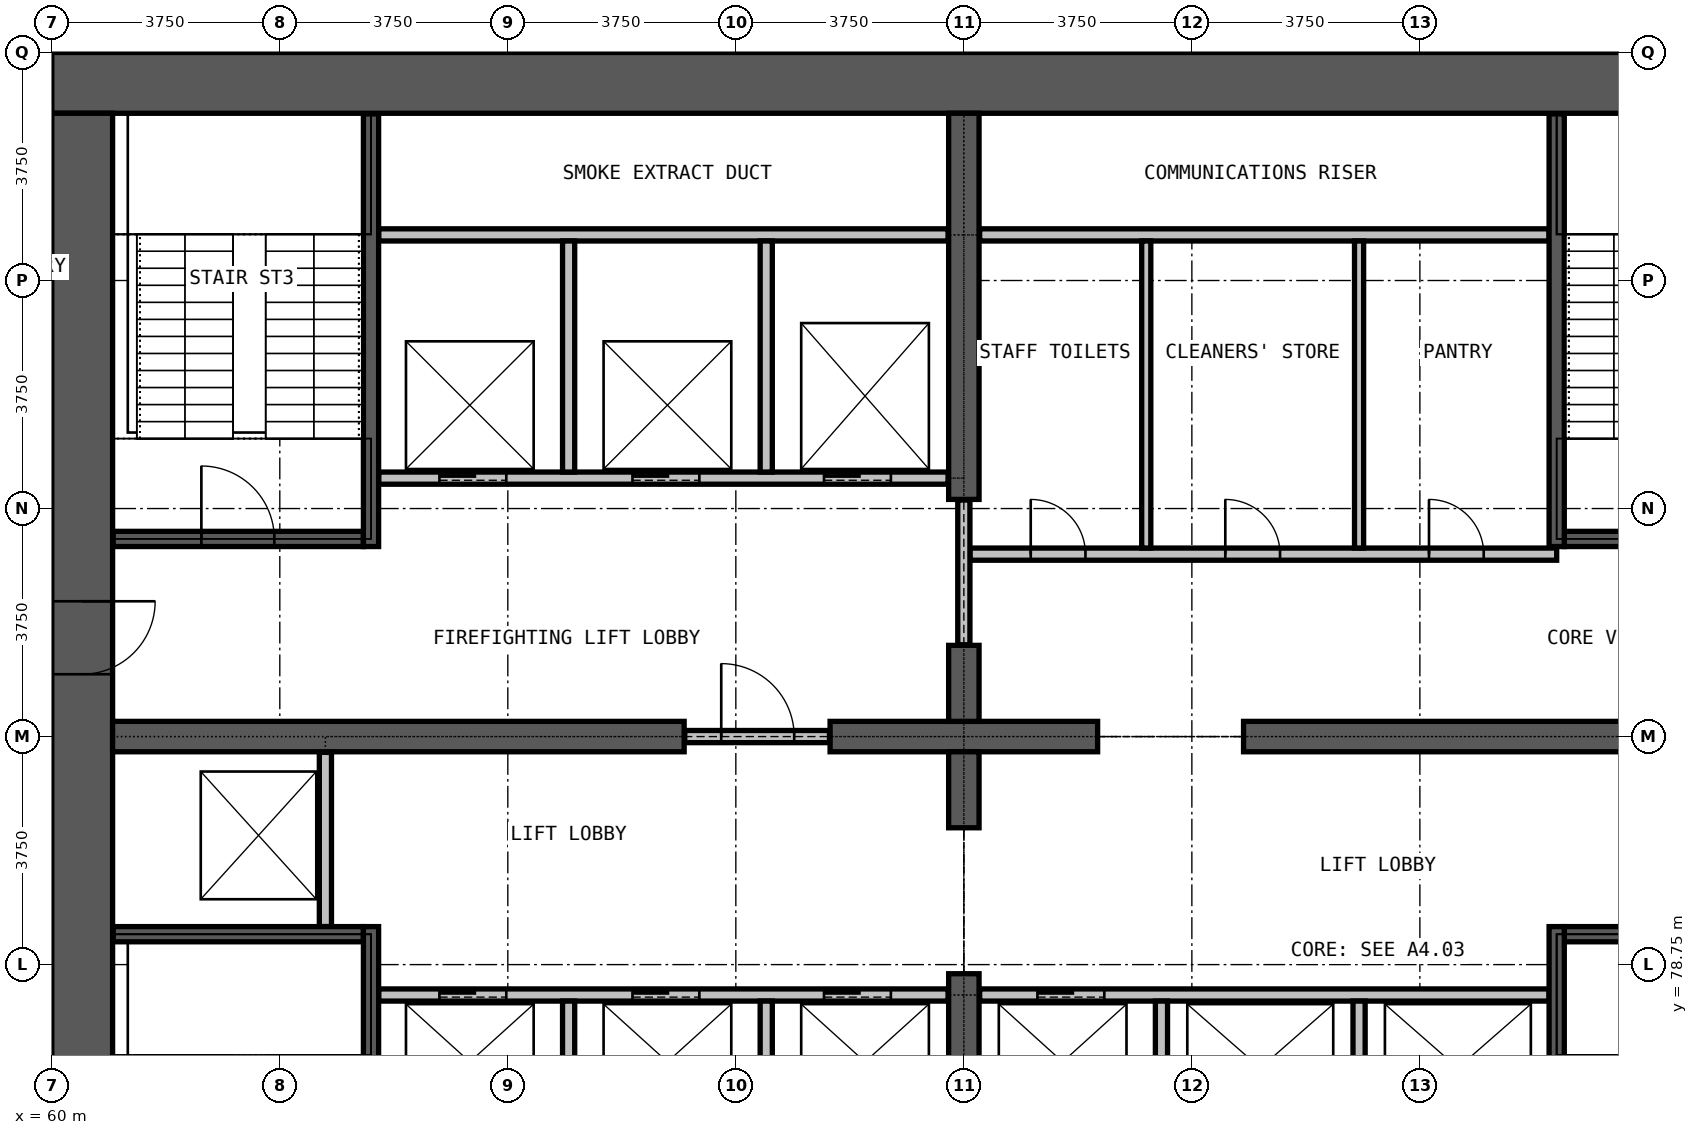
"""IFC4 building model, lengths in metres.
Left out: names, types, materials, properties, quantities, classifications, styles, units other than length and angle.
Written with IfcOpenShell. Run it as: python <this file> out.ifc"""

import sys

from ifc_helpers import new_model, si_unit, direction, frame, frame_2d, origin, place, context, subcontext, project, spatial, rectangle, extrude, element, fill, save


model = new_model("IFC4")
c1 = context("Model", 3, precision=1e-05, world=origin(), true_north=direction((0.0, 1.0)))
c2 = subcontext(c1, "Body", "Model", "MODEL_VIEW")
j1 = project(units=[si_unit("LENGTHUNIT", "METRE"), si_unit("PLANEANGLEUNIT", "RADIAN")], contexts=[c1])
p1 = place(None, origin())
s1 = spatial("IfcSite", under=j1, at=p1, CompositionType="ELEMENT")
p2 = place(p1, origin())
s2 = spatial("IfcBuilding", under=s1, at=p2, CompositionType="ELEMENT")
p3 = place(p2, frame((0.0, 0.0, 7.5)))
s3 = spatial("IfcBuildingStorey", under=s2, at=p3, CompositionType="ELEMENT", Elevation=7.5)
p4 = place(p3, frame((90.0, 93.25, 0.0), z_axis=(0.0, 0.0, 1.0), x_axis=(-1.0, 0.0, 0.0)))
e1 = element("IfcWall", 1, at=p4, inside=s3, PredefinedType="SHEAR", context=c2, shape_type="SweptSolid", body=[
    extrude(rectangle(XDim=30.0, YDim=1.0, at=frame_2d((15.0, 0.0))), origin(), (0.0, 0.0, 1.0), 9.0),
])
p5 = place(p3, frame((60.5, 92.75, 0.0), z_axis=(0.0, 0.0, 1.0), x_axis=(0.0, -1.0, 0.0)))
e2 = element("IfcWall", 2, at=p5, inside=s3, PredefinedType="SHEAR", context=c2, shape_type="SweptSolid", body=[
    extrude(rectangle(XDim=20.5, YDim=1.0, at=frame_2d((10.25, 0.0))), origin(), (0.0, 0.0, 1.0), 9.0),
])
p6 = place(p5, frame((19.025, 0.0, 0.0)))
e3 = element("IfcOpeningElement", 3, at=p6, cuts=e2, PredefinedType="OPENING", context=c2, shape_type="SweptSolid", body=[
    extrude(rectangle(XDim=1.2, YDim=2.2, at=frame_2d((0.6, 1.1))), frame((0.0, 0.51, 0.0), z_axis=(0.0, -1.0, 0.0), x_axis=(1.0, 0.0, 0.0)), (0.0, 0.0, 1.0), 1.02),
])
p7 = place(p5, frame((8.025, 0.0, 0.0)))
e4 = element("IfcOpeningElement", 4, at=p7, cuts=e2, PredefinedType="OPENING", context=c2, shape_type="SweptSolid", body=[
    extrude(rectangle(XDim=1.2, YDim=2.2, at=frame_2d((0.6, 1.1))), frame((0.0, 0.51, 0.0), z_axis=(0.0, -1.0, 0.0), x_axis=(1.0, 0.0, 0.0)), (0.0, 0.0, 1.0), 1.02),
])
p8 = place(p3, frame((61.0, 82.5, 0.0), z_axis=(0.0, 0.0, 1.0), x_axis=(1.0, 0.0, 0.0)))
e5 = element("IfcWall", 5, at=p8, inside=s3, PredefinedType="SHEAR", context=c2, shape_type="SweptSolid", body=[
    extrude(rectangle(XDim=9.4, YDim=0.5, at=frame_2d((4.7, 0.0))), origin(), (0.0, 0.0, 1.0), 9.0),
])
p9 = place(p3, frame((72.8, 82.5, 0.0), z_axis=(0.0, 0.0, 1.0), x_axis=(1.0, 0.0, 0.0)))
e6 = element("IfcWall", 6, at=p9, inside=s3, PredefinedType="SHEAR", context=c2, shape_type="SweptSolid", body=[
    extrude(rectangle(XDim=4.4, YDim=0.5, at=frame_2d((2.2, 0.0))), origin(), (0.0, 0.0, 1.0), 9.0),
])
p10 = place(p3, frame((79.6, 82.5, 0.0), z_axis=(0.0, 0.0, 1.0), x_axis=(1.0, 0.0, 0.0)))
e7 = element("IfcWall", 7, at=p10, inside=s3, PredefinedType="SHEAR", context=c2, shape_type="SweptSolid", body=[
    extrude(rectangle(XDim=9.4, YDim=0.5, at=frame_2d((4.7, 0.0))), origin(), (0.0, 0.0, 1.0), 9.0),
])
p11 = place(p3, frame((75.0, 72.25, 0.0), z_axis=(0.0, 0.0, 1.0), x_axis=(0.0, 1.0, 0.0)))
e8 = element("IfcWall", 8, at=p11, inside=s3, PredefinedType="SHEAR", context=c2, shape_type="SweptSolid", body=[
    extrude(rectangle(XDim=6.35, YDim=0.5, at=frame_2d((3.175, 0.0))), origin(), (0.0, 0.0, 1.0), 9.0),
])
for number, where, z_axis, x_axis in (
    (9, (75.0, 81.0, 0.0), (0.0, 0.0, 1.0), (0.0, 1.0, 0.0)),
    (10, (75.0, 82.75, 0.0), (0.0, 0.0, 1.0), (0.0, 1.0, 0.0)),
):
    element("IfcWall", number, at=place(p3, frame(where, z_axis=z_axis, x_axis=x_axis)), inside=s3, PredefinedType="SHEAR", context=c2, shape_type="SweptSolid", body=[
        extrude(rectangle(XDim=1.25, YDim=0.5, at=frame_2d((0.625, 0.0))), origin(), (0.0, 0.0, 1.0), 9.0),
    ])
p12 = place(p3, frame((75.0, 86.4, 0.0), z_axis=(0.0, 0.0, 1.0), x_axis=(0.0, 1.0, 0.0)))
e11 = element("IfcWall", 11, at=p12, inside=s3, PredefinedType="SHEAR", context=c2, shape_type="SweptSolid", body=[
    extrude(rectangle(XDim=6.35, YDim=0.5, at=frame_2d((3.175, 0.0))), origin(), (0.0, 0.0, 1.0), 9.0),
])
p13 = place(p3, frame((70.41, 82.5, 0.0), z_axis=(0.0, 0.0, 1.0), x_axis=(1.0, 0.0, 0.0)))
e12 = element("IfcWall", 12, at=p13, inside=s3, PredefinedType="PARTITIONING", context=c2, shape_type="SweptSolid", body=[
    extrude(rectangle(XDim=2.38, YDim=0.2, at=frame_2d((1.19, 0.0))), origin(), (0.0, 0.0, 1.0), 2.4),
])
p14 = place(p13, frame((0.6, 0.0, 0.0)))
e13 = element("IfcOpeningElement", 13, at=p14, cuts=e12, PredefinedType="OPENING", context=c2, shape_type="SweptSolid", body=[
    extrude(rectangle(XDim=1.2, YDim=2.2, at=frame_2d((0.6, 1.1))), frame((0.0, 0.11, 0.0), z_axis=(0.0, -1.0, 0.0), x_axis=(1.0, 0.0, 0.0)), (0.0, 0.0, 1.0), 0.22),
])
p15 = place(p3, frame((75.1, 85.5, 0.0), z_axis=(0.0, 0.0, 1.0), x_axis=(1.0, 0.0, 0.0)))
e14 = element("IfcWall", 14, at=p15, inside=s3, PredefinedType="PARTITIONING", context=c2, shape_type="SweptSolid", body=[
    extrude(rectangle(XDim=9.65, YDim=0.2, at=frame_2d((4.825, 0.0))), origin(), (0.0, 0.0, 1.0), 8.65),
])
p16 = place(p15, frame((1.0, 0.0, 0.0)))
e15 = element("IfcOpeningElement", 15, at=p16, cuts=e14, PredefinedType="OPENING", context=c2, shape_type="SweptSolid", body=[
    extrude(rectangle(XDim=0.9, YDim=2.2, at=frame_2d((0.45, 1.1))), frame((0.0, 0.11, 0.0), z_axis=(0.0, -1.0, 0.0), x_axis=(1.0, 0.0, 0.0)), (0.0, 0.0, 1.0), 0.22),
])
p17 = place(p15, frame((4.2, 0.0, 0.0)))
e16 = element("IfcOpeningElement", 16, at=p17, cuts=e14, PredefinedType="OPENING", context=c2, shape_type="SweptSolid", body=[
    extrude(rectangle(XDim=0.9, YDim=2.2, at=frame_2d((0.45, 1.1))), frame((0.0, 0.11, 0.0), z_axis=(0.0, -1.0, 0.0), x_axis=(1.0, 0.0, 0.0)), (0.0, 0.0, 1.0), 0.22),
])
p18 = place(p15, frame((7.55, 0.0, 0.0)))
e17 = element("IfcOpeningElement", 17, at=p18, cuts=e14, PredefinedType="OPENING", context=c2, shape_type="SweptSolid", body=[
    extrude(rectangle(XDim=0.9, YDim=2.2, at=frame_2d((0.45, 1.1))), frame((0.0, 0.11, 0.0), z_axis=(0.0, -1.0, 0.0), x_axis=(1.0, 0.0, 0.0)), (0.0, 0.0, 1.0), 0.22),
])
p19 = place(p3, frame((75.26, 90.75, 0.0), z_axis=(0.0, 0.0, 1.0), x_axis=(1.0, 0.0, 0.0)))
e18 = element("IfcWall", 18, at=p19, inside=s3, PredefinedType="PARTITIONING", context=c2, shape_type="SweptSolid", body=[
    extrude(rectangle(XDim=9.365, YDim=0.2, at=frame_2d((4.683, 0.0))), origin(), (0.0, 0.0, 1.0), 8.65),
])
p20 = place(p3, frame((75.0, 84.01, 0.0), z_axis=(0.0, 0.0, 1.0), x_axis=(0.0, 1.0, 0.0)))
e19 = element("IfcWall", 19, at=p20, inside=s3, PredefinedType="PARTITIONING", context=c2, shape_type="SweptSolid", body=[
    extrude(rectangle(XDim=2.38, YDim=0.2, at=frame_2d((1.19, 0.0))), origin(), (0.0, 0.0, 1.0), 2.4),
])
for number, where, z_axis, x_axis in (
    (20, (78.0, 85.6, 0.0), (0.0, 0.0, 1.0), (0.0, 1.0, 0.0)),
    (21, (81.5, 85.6, 0.0), (0.0, 0.0, 1.0), (0.0, 1.0, 0.0)),
):
    element("IfcWall", number, at=place(p3, frame(where, z_axis=z_axis, x_axis=x_axis)), inside=s3, PredefinedType="PARTITIONING", context=c2, shape_type="SweptSolid", body=[
        extrude(rectangle(XDim=5.05, YDim=0.15, at=frame_2d((2.525, 0.0))), origin(), (0.0, 0.0, 1.0), 8.65),
    ])
p21 = place(p3, frame((65.375, 78.25, 0.0), z_axis=(0.0, 0.0, 1.0), x_axis=(1.0, 0.0, 0.0)))
e22 = element("IfcWall", 22, at=p21, inside=s3, PredefinedType="PARTITIONING", context=c2, shape_type="SweptSolid", body=[
    extrude(rectangle(XDim=9.365, YDim=0.2, at=frame_2d((4.683, 0.0))), origin(), (0.0, 0.0, 1.0), 8.65),
])
p22 = place(p21, frame((1.0, 0.0, 0.0)))
e23 = element("IfcOpeningElement", 23, at=p22, cuts=e22, PredefinedType="OPENING", context=c2, shape_type="SweptSolid", body=[
    extrude(rectangle(XDim=1.1, YDim=2.2, at=frame_2d((0.55, 1.1))), frame((0.0, 0.11, 0.0), z_axis=(0.0, -1.0, 0.0), x_axis=(1.0, 0.0, 0.0)), (0.0, 0.0, 1.0), 0.22),
])
p23 = place(p21, frame((4.175, 0.0, 0.0)))
e24 = element("IfcOpeningElement", 24, at=p23, cuts=e22, PredefinedType="OPENING", context=c2, shape_type="SweptSolid", body=[
    extrude(rectangle(XDim=1.1, YDim=2.2, at=frame_2d((0.55, 1.1))), frame((0.0, 0.11, 0.0), z_axis=(0.0, -1.0, 0.0), x_axis=(1.0, 0.0, 0.0)), (0.0, 0.0, 1.0), 0.22),
])
p24 = place(p21, frame((7.325, 0.0, 0.0)))
e25 = element("IfcOpeningElement", 25, at=p24, cuts=e22, PredefinedType="OPENING", context=c2, shape_type="SweptSolid", body=[
    extrude(rectangle(XDim=1.1, YDim=2.2, at=frame_2d((0.55, 1.1))), frame((0.0, 0.11, 0.0), z_axis=(0.0, -1.0, 0.0), x_axis=(1.0, 0.0, 0.0)), (0.0, 0.0, 1.0), 0.22),
])
p25 = place(p3, frame((75.26, 78.25, 0.0), z_axis=(0.0, 0.0, 1.0), x_axis=(1.0, 0.0, 0.0)))
e26 = element("IfcWall", 26, at=p25, inside=s3, PredefinedType="PARTITIONING", context=c2, shape_type="SweptSolid", body=[
    extrude(rectangle(XDim=9.365, YDim=0.2, at=frame_2d((4.683, 0.0))), origin(), (0.0, 0.0, 1.0), 8.65),
])
p26 = place(p25, frame((0.95, 0.0, 0.0)))
e27 = element("IfcOpeningElement", 27, at=p26, cuts=e26, PredefinedType="OPENING", context=c2, shape_type="SweptSolid", body=[
    extrude(rectangle(XDim=1.1, YDim=2.2, at=frame_2d((0.55, 1.1))), frame((0.0, 0.11, 0.0), z_axis=(0.0, -1.0, 0.0), x_axis=(1.0, 0.0, 0.0)), (0.0, 0.0, 1.0), 0.22),
])
p27 = place(p3, frame((65.375, 86.75, 0.0), z_axis=(0.0, 0.0, 1.0), x_axis=(1.0, 0.0, 0.0)))
e28 = element("IfcWall", 28, at=p27, inside=s3, PredefinedType="PARTITIONING", context=c2, shape_type="SweptSolid", body=[
    extrude(rectangle(XDim=9.365, YDim=0.2, at=frame_2d((4.683, 0.0))), origin(), (0.0, 0.0, 1.0), 8.65),
])
p28 = place(p27, frame((1.0, 0.0, 0.0)))
e29 = element("IfcOpeningElement", 29, at=p28, cuts=e28, PredefinedType="OPENING", context=c2, shape_type="SweptSolid", body=[
    extrude(rectangle(XDim=1.1, YDim=2.2, at=frame_2d((0.55, 1.1))), frame((0.0, 0.11, 0.0), z_axis=(0.0, -1.0, 0.0), x_axis=(1.0, 0.0, 0.0)), (0.0, 0.0, 1.0), 0.22),
])
p29 = place(p27, frame((4.175, 0.0, 0.0)))
e30 = element("IfcOpeningElement", 30, at=p29, cuts=e28, PredefinedType="OPENING", context=c2, shape_type="SweptSolid", body=[
    extrude(rectangle(XDim=1.1, YDim=2.2, at=frame_2d((0.55, 1.1))), frame((0.0, 0.11, 0.0), z_axis=(0.0, -1.0, 0.0), x_axis=(1.0, 0.0, 0.0)), (0.0, 0.0, 1.0), 0.22),
])
p30 = place(p27, frame((7.325, 0.0, 0.0)))
e31 = element("IfcOpeningElement", 31, at=p30, cuts=e28, PredefinedType="OPENING", context=c2, shape_type="SweptSolid", body=[
    extrude(rectangle(XDim=1.1, YDim=2.2, at=frame_2d((0.55, 1.1))), frame((0.0, 0.11, 0.0), z_axis=(0.0, -1.0, 0.0), x_axis=(1.0, 0.0, 0.0)), (0.0, 0.0, 1.0), 0.22),
])
p31 = place(p3, frame((65.375, 90.75, 0.0), z_axis=(0.0, 0.0, 1.0), x_axis=(1.0, 0.0, 0.0)))
e32 = element("IfcWall", 32, at=p31, inside=s3, PredefinedType="PARTITIONING", context=c2, shape_type="SweptSolid", body=[
    extrude(rectangle(XDim=9.365, YDim=0.2, at=frame_2d((4.683, 0.0))), origin(), (0.0, 0.0, 1.0), 8.65),
])
p32 = place(p3, frame((64.5, 79.375, 0.0), z_axis=(0.0, 0.0, 1.0), x_axis=(0.0, 1.0, 0.0)))
e33 = element("IfcWall", 33, at=p32, inside=s3, PredefinedType="PARTITIONING", context=c2, shape_type="SweptSolid", body=[
    extrude(rectangle(XDim=2.865, YDim=0.2, at=frame_2d((1.433, 0.0))), origin(), (0.0, 0.0, 1.0), 8.65),
])
for number, where, z_axis, x_axis in (
    (34, (68.5, 74.35, 0.0), (0.0, 0.0, 1.0), (0.0, 1.0, 0.0)),
    (35, (68.5, 86.85, 0.0), (0.0, 0.0, 1.0), (0.0, 1.0, 0.0)),
    (36, (71.75, 74.35, 0.0), (0.0, 0.0, 1.0), (0.0, 1.0, 0.0)),
    (37, (71.75, 86.85, 0.0), (0.0, 0.0, 1.0), (0.0, 1.0, 0.0)),
    (38, (78.25, 74.35, 0.0), (0.0, 0.0, 1.0), (0.0, 1.0, 0.0)),
    (39, (81.5, 74.35, 0.0), (0.0, 0.0, 1.0), (0.0, 1.0, 0.0)),
):
    element("IfcWall", number, at=place(p3, frame(where, z_axis=z_axis, x_axis=x_axis)), inside=s3, PredefinedType="PARTITIONING", context=c2, shape_type="SweptSolid", body=[
        extrude(rectangle(XDim=3.8, YDim=0.2, at=frame_2d((1.9, 0.0))), origin(), (0.0, 0.0, 1.0), 8.65),
    ])
for number, where, z_axis, x_axis in (
    (40, (61.01, 79.25, 0.0), (0.0, 0.0, 1.0), (1.0, 0.0, 0.0)),
    (41, (84.875, 79.25, 0.0), (0.0, 0.0, 1.0), (1.0, 0.0, 0.0)),
):
    element("IfcWall", number, at=place(p3, frame(where, z_axis=z_axis, x_axis=x_axis)), inside=s3, PredefinedType="PARTITIONING", context=c2, shape_type="SweptSolid", body=[
        extrude(rectangle(XDim=4.115, YDim=0.25, at=frame_2d((2.058, 0.0))), origin(), (0.0, 0.0, 1.0), 8.65),
    ])
p33 = place(p3, frame((61.01, 85.75, 0.0), z_axis=(0.0, 0.0, 1.0), x_axis=(1.0, 0.0, 0.0)))
e42 = element("IfcWall", 42, at=p33, inside=s3, PredefinedType="PARTITIONING", context=c2, shape_type="SweptSolid", body=[
    extrude(rectangle(XDim=4.115, YDim=0.25, at=frame_2d((2.058, 0.0))), origin(), (0.0, 0.0, 1.0), 8.65),
])
p34 = place(p33, frame((1.45, 0.0, 0.0)))
e43 = element("IfcOpeningElement", 43, at=p34, cuts=e42, PredefinedType="OPENING", context=c2, shape_type="SweptSolid", body=[
    extrude(rectangle(XDim=1.2, YDim=2.2, at=frame_2d((0.6, 1.1))), frame((0.0, 0.135, 0.0), z_axis=(0.0, -1.0, 0.0), x_axis=(1.0, 0.0, 0.0)), (0.0, 0.0, 1.0), 0.27),
])
p35 = place(p3, frame((84.875, 85.75, 0.0), z_axis=(0.0, 0.0, 1.0), x_axis=(1.0, 0.0, 0.0)))
e44 = element("IfcWall", 44, at=p35, inside=s3, PredefinedType="PARTITIONING", context=c2, shape_type="SweptSolid", body=[
    extrude(rectangle(XDim=4.115, YDim=0.25, at=frame_2d((2.058, 0.0))), origin(), (0.0, 0.0, 1.0), 8.65),
])
for number, where, z_axis, x_axis in (
    (45, (65.25, 72.26, 0.0), (0.0, 0.0, 1.0), (0.0, 1.0, 0.0)),
    (46, (65.25, 85.625, 0.0), (0.0, 0.0, 1.0), (0.0, 1.0, 0.0)),
    (47, (84.75, 72.26, 0.0), (0.0, 0.0, 1.0), (0.0, 1.0, 0.0)),
    (48, (84.75, 85.625, 0.0), (0.0, 0.0, 1.0), (0.0, 1.0, 0.0)),
):
    element("IfcWall", number, at=place(p3, frame(where, z_axis=z_axis, x_axis=x_axis)), inside=s3, PredefinedType="PARTITIONING", context=c2, shape_type="SweptSolid", body=[
        extrude(rectangle(XDim=7.115, YDim=0.25, at=frame_2d((3.558, 0.0))), origin(), (0.0, 0.0, 1.0), 8.65),
    ])
p36 = place(p22, origin())
e49 = element("IfcDoor", 49, at=p36, inside=s3, OperationType="DOUBLE_DOOR_SLIDING", PredefinedType="DOOR", context=c2, shape_type="SweptSolid", body=[
    extrude(rectangle(XDim=1.1, YDim=2.2, at=frame_2d((0.55, 1.1))), frame((0.0, 0.025, 0.0), z_axis=(0.0, -1.0, 0.0), x_axis=(1.0, 0.0, 0.0)), (0.0, 0.0, 1.0), 0.05),
])
fill(e23, e49)
p37 = place(p23, origin())
e50 = element("IfcDoor", 50, at=p37, inside=s3, OperationType="DOUBLE_DOOR_SLIDING", PredefinedType="DOOR", context=c2, shape_type="SweptSolid", body=[
    extrude(rectangle(XDim=1.1, YDim=2.2, at=frame_2d((0.55, 1.1))), frame((0.0, 0.025, 0.0), z_axis=(0.0, -1.0, 0.0), x_axis=(1.0, 0.0, 0.0)), (0.0, 0.0, 1.0), 0.05),
])
fill(e24, e50)
p38 = place(p24, origin())
e51 = element("IfcDoor", 51, at=p38, inside=s3, OperationType="DOUBLE_DOOR_SLIDING", PredefinedType="DOOR", context=c2, shape_type="SweptSolid", body=[
    extrude(rectangle(XDim=1.1, YDim=2.2, at=frame_2d((0.55, 1.1))), frame((0.0, 0.025, 0.0), z_axis=(0.0, -1.0, 0.0), x_axis=(1.0, 0.0, 0.0)), (0.0, 0.0, 1.0), 0.05),
])
fill(e25, e51)
p39 = place(p26, origin())
e52 = element("IfcDoor", 52, at=p39, inside=s3, OperationType="DOUBLE_DOOR_SLIDING", PredefinedType="DOOR", context=c2, shape_type="SweptSolid", body=[
    extrude(rectangle(XDim=1.1, YDim=2.2, at=frame_2d((0.55, 1.1))), frame((0.0, 0.025, 0.0), z_axis=(0.0, -1.0, 0.0), x_axis=(1.0, 0.0, 0.0)), (0.0, 0.0, 1.0), 0.05),
])
fill(e27, e52)
p40 = place(p28, origin())
e53 = element("IfcDoor", 53, at=p40, inside=s3, OperationType="DOUBLE_DOOR_SLIDING", PredefinedType="DOOR", context=c2, shape_type="SweptSolid", body=[
    extrude(rectangle(XDim=1.1, YDim=2.2, at=frame_2d((0.55, 1.1))), frame((0.0, 0.025, 0.0), z_axis=(0.0, -1.0, 0.0), x_axis=(1.0, 0.0, 0.0)), (0.0, 0.0, 1.0), 0.05),
])
fill(e29, e53)
p41 = place(p29, origin())
e54 = element("IfcDoor", 54, at=p41, inside=s3, OperationType="DOUBLE_DOOR_SLIDING", PredefinedType="DOOR", context=c2, shape_type="SweptSolid", body=[
    extrude(rectangle(XDim=1.1, YDim=2.2, at=frame_2d((0.55, 1.1))), frame((0.0, 0.025, 0.0), z_axis=(0.0, -1.0, 0.0), x_axis=(1.0, 0.0, 0.0)), (0.0, 0.0, 1.0), 0.05),
])
fill(e30, e54)
p42 = place(p30, origin())
e55 = element("IfcDoor", 55, at=p42, inside=s3, OperationType="DOUBLE_DOOR_SLIDING", PredefinedType="DOOR", context=c2, shape_type="SweptSolid", body=[
    extrude(rectangle(XDim=1.1, YDim=2.2, at=frame_2d((0.55, 1.1))), frame((0.0, 0.025, 0.0), z_axis=(0.0, -1.0, 0.0), x_axis=(1.0, 0.0, 0.0)), (0.0, 0.0, 1.0), 0.05),
])
fill(e31, e55)
p43 = place(p14, origin())
e56 = element("IfcDoor", 56, at=p43, inside=s3, OperationType="SINGLE_SWING_RIGHT", PredefinedType="DOOR", context=c2, shape_type="SweptSolid", body=[
    extrude(rectangle(XDim=1.2, YDim=2.2, at=frame_2d((0.6, 1.1))), frame((0.0, 0.025, 0.0), z_axis=(0.0, -1.0, 0.0), x_axis=(1.0, 0.0, 0.0)), (0.0, 0.0, 1.0), 0.05),
])
fill(e13, e56)
p44 = place(p34, origin())
e57 = element("IfcDoor", 57, at=p44, inside=s3, OperationType="SINGLE_SWING_LEFT", PredefinedType="DOOR", context=c2, shape_type="SweptSolid", body=[
    extrude(rectangle(XDim=1.2, YDim=2.2, at=frame_2d((0.6, 1.1))), frame((0.0, 0.025, 0.0), z_axis=(0.0, -1.0, 0.0), x_axis=(1.0, 0.0, 0.0)), (0.0, 0.0, 1.0), 0.05),
])
fill(e43, e57)
p45 = place(p7, origin())
e58 = element("IfcDoor", 58, at=p45, inside=s3, OperationType="SINGLE_SWING_LEFT", PredefinedType="DOOR", context=c2, shape_type="SweptSolid", body=[
    extrude(rectangle(XDim=1.2, YDim=2.2, at=frame_2d((0.6, 1.1))), frame((0.0, 0.025, 0.0), z_axis=(0.0, -1.0, 0.0), x_axis=(1.0, 0.0, 0.0)), (0.0, 0.0, 1.0), 0.05),
])
fill(e4, e58)
p46 = place(p16, origin())
e59 = element("IfcDoor", 59, at=p46, inside=s3, OperationType="SINGLE_SWING_RIGHT", PredefinedType="DOOR", context=c2, shape_type="SweptSolid", body=[
    extrude(rectangle(XDim=0.9, YDim=2.2, at=frame_2d((0.45, 1.1))), frame((0.0, 0.025, 0.0), z_axis=(0.0, -1.0, 0.0), x_axis=(1.0, 0.0, 0.0)), (0.0, 0.0, 1.0), 0.05),
])
fill(e15, e59)
p47 = place(p17, origin())
e60 = element("IfcDoor", 60, at=p47, inside=s3, OperationType="SINGLE_SWING_LEFT", PredefinedType="DOOR", context=c2, shape_type="SweptSolid", body=[
    extrude(rectangle(XDim=0.9, YDim=2.2, at=frame_2d((0.45, 1.1))), frame((0.0, 0.025, 0.0), z_axis=(0.0, -1.0, 0.0), x_axis=(1.0, 0.0, 0.0)), (0.0, 0.0, 1.0), 0.05),
])
fill(e16, e60)
p48 = place(p18, origin())
e61 = element("IfcDoor", 61, at=p48, inside=s3, OperationType="SINGLE_SWING_LEFT", PredefinedType="DOOR", context=c2, shape_type="SweptSolid", body=[
    extrude(rectangle(XDim=0.9, YDim=2.2, at=frame_2d((0.45, 1.1))), frame((0.0, 0.025, 0.0), z_axis=(0.0, -1.0, 0.0), x_axis=(1.0, 0.0, 0.0)), (0.0, 0.0, 1.0), 0.05),
])
fill(e17, e61)
save(model, sys.argv[1])
